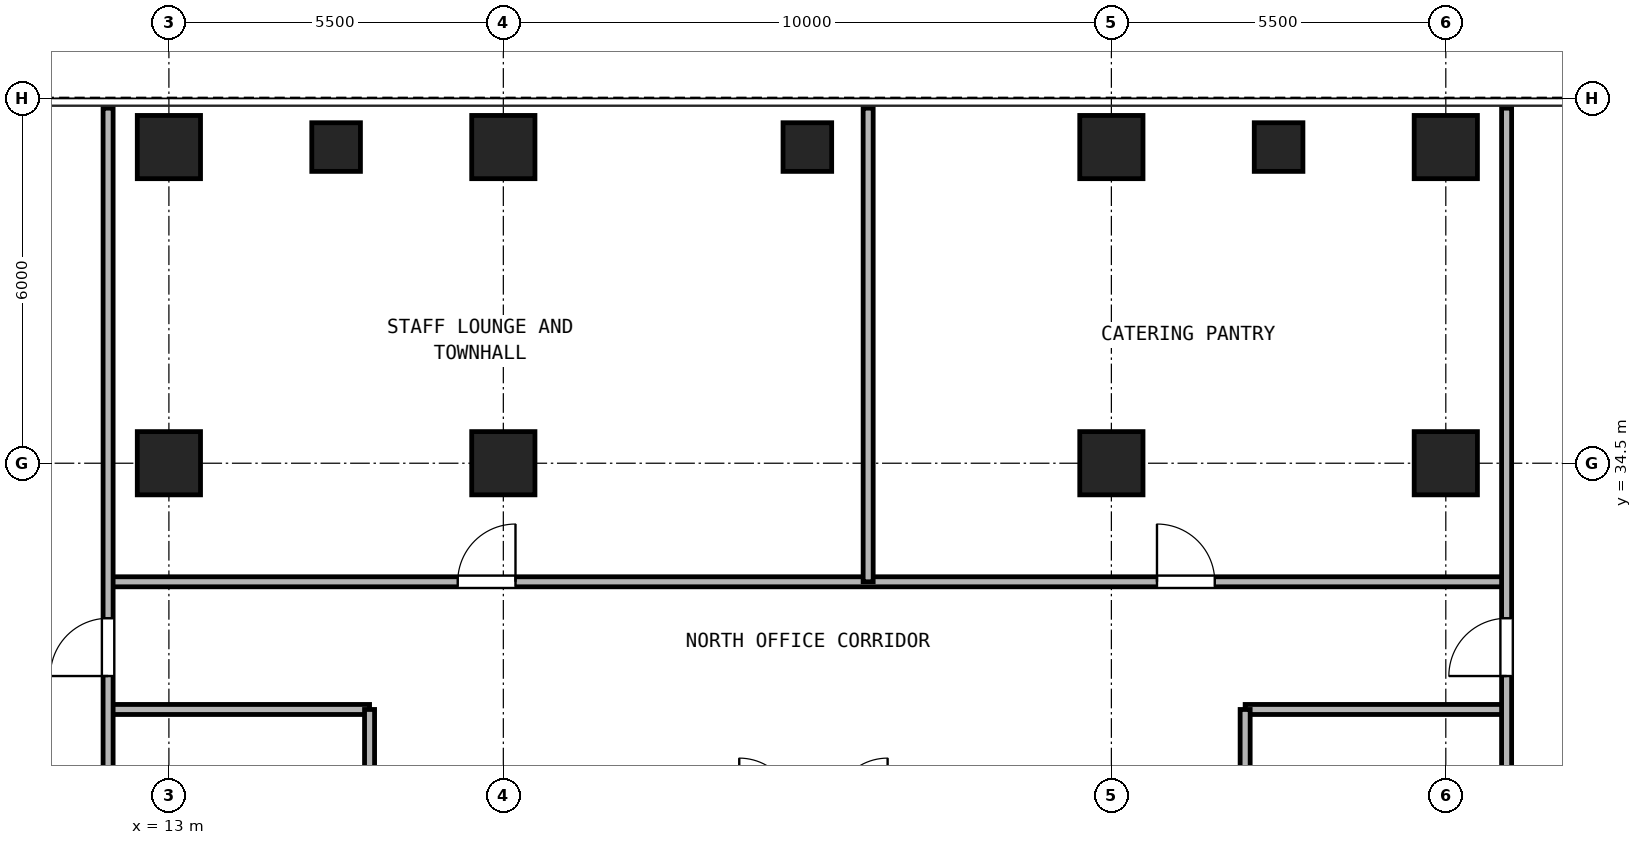
"""IFC4 building model, lengths in metres.
Left out: names, types, materials, properties, quantities, classifications, styles, units other than length and angle.
Written with IfcOpenShell. Run it as: python <this file> out.ifc"""

import sys

from ifc_helpers import new_model, si_unit, direction, frame, frame_2d, origin, origin_2d, place, context, subcontext, project, spatial, rectangle, hollow_rectangle, extrude, source, transform, mapped, element, fill, save


model = new_model("IFC4")
c1 = context("Model", 3, precision=1e-05, world=origin(), true_north=direction((0.0, 1.0)))
c2 = subcontext(c1, "Body", "Model", "MODEL_VIEW")
j1 = project(units=[si_unit("LENGTHUNIT", "METRE"), si_unit("PLANEANGLEUNIT", "RADIAN")], contexts=[c1])
p1 = place(None, origin())
s1 = spatial("IfcSite", under=j1, at=p1, CompositionType="ELEMENT")
p2 = place(p1, origin())
s2 = spatial("IfcBuilding", under=s1, at=p2, CompositionType="ELEMENT")
p3 = place(p2, frame((0.0, 0.0, 62.1)))
s3 = spatial("IfcBuildingStorey", under=s2, at=p3, CompositionType="ELEMENT", Elevation=62.1)
m1 = source(origin(), c2, "Body", "SweptSolid", [
    extrude(hollow_rectangle(XDim=1.04, YDim=1.04, WallThickness=0.065, at=origin_2d()), origin(), (0.0, 0.0, 1.0), 3.32),
])
for number, where, z_axis, x_axis in (
    (1, (13.0, 39.7, 0.0), (0.0, 0.0, 1.0), (1.0, 0.0, 0.0)),
    (2, (18.5, 39.7, 0.0), (0.0, 0.0, 1.0), (1.0, 0.0, 0.0)),
    (3, (28.5, 39.7, 0.0), (0.0, 0.0, 1.0), (1.0, 0.0, 0.0)),
    (4, (34.0, 39.7, 0.0), (0.0, 0.0, 1.0), (1.0, 0.0, 0.0)),
    (5, (13.0, 34.5, 0.0), (0.0, 0.0, 1.0), (1.0, 0.0, 0.0)),
    (6, (18.5, 34.5, 0.0), (0.0, 0.0, 1.0), (1.0, 0.0, 0.0)),
    (7, (28.5, 34.5, 0.0), (0.0, 0.0, 1.0), (1.0, 0.0, 0.0)),
    (8, (34.0, 34.5, 0.0), (0.0, 0.0, 1.0), (1.0, 0.0, 0.0)),
):
    element("IfcColumn", number, at=place(p3, frame(where, z_axis=z_axis, x_axis=x_axis)), inside=s3, PredefinedType="COLUMN", context=c2, shape_type="MappedRepresentation", body=[
        mapped(m1, transform((0.0, 0.0, 0.0), x_axis=(1.0, 0.0, 0.0), y_axis=(0.0, 1.0, 0.0), z_axis=(0.0, 0.0, 1.0), scale=1.0)),
    ])
m2 = source(origin(), c2, "Body", "SweptSolid", [
    extrude(hollow_rectangle(XDim=0.8, YDim=0.8, WallThickness=0.045, at=origin_2d()), origin(), (0.0, 0.0, 1.0), 3.32),
])
for number, where, z_axis, x_axis in (
    (9, (15.75, 39.7, 0.0), (0.0, 0.0, 1.0), (1.0, 0.0, 0.0)),
    (10, (23.5, 39.7, 0.0), (0.0, 0.0, 1.0), (1.0, 0.0, 0.0)),
    (11, (31.25, 39.7, 0.0), (0.0, 0.0, 1.0), (1.0, 0.0, 0.0)),
):
    element("IfcColumn", number, at=place(p3, frame(where, z_axis=z_axis, x_axis=x_axis)), inside=s3, PredefinedType="COLUMN", context=c2, shape_type="MappedRepresentation", body=[
        mapped(m2, transform((0.0, 0.0, 0.0), x_axis=(1.0, 0.0, 0.0), y_axis=(0.0, 1.0, 0.0), z_axis=(0.0, 0.0, 1.0), scale=1.0)),
    ])
p4 = place(p3, frame((12.0, 32.55, 0.0), z_axis=(0.0, 0.0, 1.0), x_axis=(1.0, 0.0, 0.0)))
e12 = element("IfcWall", 12, at=p4, inside=s3, PredefinedType="PARTITIONING", context=c2, shape_type="SweptSolid", body=[
    extrude(rectangle(XDim=23.0, YDim=0.165, at=frame_2d((11.5, 0.0))), origin(), (0.0, 0.0, 1.0), 3.32),
])
p5 = place(p4, frame((5.75, 0.0, 0.0)))
e13 = element("IfcOpeningElement", 13, at=p5, cuts=e12, PredefinedType="OPENING", context=c2, shape_type="SweptSolid", body=[
    extrude(rectangle(XDim=0.95, YDim=2.15, at=frame_2d((0.475, 1.075))), frame((0.0, 0.093, 0.0), z_axis=(0.0, -1.0, 0.0), x_axis=(1.0, 0.0, 0.0)), (0.0, 0.0, 1.0), 0.185),
])
p6 = place(p4, frame((17.25, 0.0, 0.0)))
e14 = element("IfcOpeningElement", 14, at=p6, cuts=e12, PredefinedType="OPENING", context=c2, shape_type="SweptSolid", body=[
    extrude(rectangle(XDim=0.95, YDim=2.15, at=frame_2d((0.475, 1.075))), frame((0.0, 0.093, 0.0), z_axis=(0.0, -1.0, 0.0), x_axis=(1.0, 0.0, 0.0)), (0.0, 0.0, 1.0), 0.185),
])
for number, where, z_axis, x_axis in (
    (15, (12.0, 30.45, 0.0), (0.0, 0.0, 1.0), (1.0, 0.0, 0.0)),
    (16, (30.7, 30.45, 0.0), (0.0, 0.0, 1.0), (1.0, 0.0, 0.0)),
):
    element("IfcWall", number, at=place(p3, frame(where, z_axis=z_axis, x_axis=x_axis)), inside=s3, PredefinedType="PARTITIONING", context=c2, shape_type="SweptSolid", body=[
        extrude(rectangle(XDim=4.3, YDim=0.165, at=frame_2d((2.15, 0.0))), origin(), (0.0, 0.0, 1.0), 3.32),
    ])
p7 = place(p3, frame((16.3, 9.55, 0.0), z_axis=(0.0, 0.0, 1.0), x_axis=(0.0, 1.0, 0.0)))
e17 = element("IfcWall", 17, at=p7, inside=s3, PredefinedType="PARTITIONING", context=c2, shape_type="SweptSolid", body=[
    extrude(rectangle(XDim=20.9, YDim=0.165, at=frame_2d((10.45, 0.0))), origin(), (0.0, 0.0, 1.0), 3.32),
])
p8 = place(p7, frame((6.231, 0.0, 0.0)))
e18 = element("IfcOpeningElement", 18, at=p8, cuts=e17, PredefinedType="OPENING", context=c2, shape_type="SweptSolid", body=[
    extrude(rectangle(XDim=0.95, YDim=2.15, at=frame_2d((0.475, 1.075))), frame((0.0, 0.093, 0.0), z_axis=(0.0, -1.0, 0.0), x_axis=(1.0, 0.0, 0.0)), (0.0, 0.0, 1.0), 0.185),
])
p9 = place(p7, frame((16.681, 0.0, 0.0)))
e19 = element("IfcOpeningElement", 19, at=p9, cuts=e17, PredefinedType="OPENING", context=c2, shape_type="SweptSolid", body=[
    extrude(rectangle(XDim=0.95, YDim=2.15, at=frame_2d((0.475, 1.075))), frame((0.0, 0.093, 0.0), z_axis=(0.0, -1.0, 0.0), x_axis=(1.0, 0.0, 0.0)), (0.0, 0.0, 1.0), 0.185),
])
p10 = place(p3, frame((30.7, 9.55, 0.0), z_axis=(0.0, 0.0, 1.0), x_axis=(0.0, 1.0, 0.0)))
e20 = element("IfcWall", 20, at=p10, inside=s3, PredefinedType="PARTITIONING", context=c2, shape_type="SweptSolid", body=[
    extrude(rectangle(XDim=20.9, YDim=0.165, at=frame_2d((10.45, 0.0))), origin(), (0.0, 0.0, 1.0), 3.32),
])
p11 = place(p10, frame((9.95, 0.0, 0.0)))
e21 = element("IfcOpeningElement", 21, at=p11, cuts=e20, PredefinedType="OPENING", context=c2, shape_type="SweptSolid", body=[
    extrude(rectangle(XDim=0.95, YDim=2.15, at=frame_2d((0.475, 1.075))), frame((0.0, 0.093, 0.0), z_axis=(0.0, -1.0, 0.0), x_axis=(1.0, 0.0, 0.0)), (0.0, 0.0, 1.0), 0.185),
])
p12 = place(p3, frame((12.0, 0.16, 0.0), z_axis=(0.0, 0.0, 1.0), x_axis=(0.0, 1.0, 0.0)))
e22 = element("IfcWall", 22, at=p12, inside=s3, PredefinedType="PARTITIONING", context=c2, shape_type="SweptSolid", body=[
    extrude(rectangle(XDim=40.18, YDim=0.165, at=frame_2d((20.09, 0.0))), origin(), (0.0, 0.0, 1.0), 3.32),
])
p13 = place(p12, frame((7.84, 0.0, 0.0)))
e23 = element("IfcOpeningElement", 23, at=p13, cuts=e22, PredefinedType="OPENING", context=c2, shape_type="SweptSolid", body=[
    extrude(rectangle(XDim=0.95, YDim=2.15, at=frame_2d((0.475, 1.075))), frame((0.0, 0.093, 0.0), z_axis=(0.0, -1.0, 0.0), x_axis=(1.0, 0.0, 0.0)), (0.0, 0.0, 1.0), 0.185),
])
p14 = place(p12, frame((30.84, 0.0, 0.0)))
e24 = element("IfcOpeningElement", 24, at=p14, cuts=e22, PredefinedType="OPENING", context=c2, shape_type="SweptSolid", body=[
    extrude(rectangle(XDim=0.95, YDim=2.15, at=frame_2d((0.475, 1.075))), frame((0.0, 0.093, 0.0), z_axis=(0.0, -1.0, 0.0), x_axis=(1.0, 0.0, 0.0)), (0.0, 0.0, 1.0), 0.185),
])
p15 = place(p3, frame((35.0, 0.16, 0.0), z_axis=(0.0, 0.0, 1.0), x_axis=(0.0, 1.0, 0.0)))
e25 = element("IfcWall", 25, at=p15, inside=s3, PredefinedType="PARTITIONING", context=c2, shape_type="SweptSolid", body=[
    extrude(rectangle(XDim=40.18, YDim=0.165, at=frame_2d((20.09, 0.0))), origin(), (0.0, 0.0, 1.0), 3.32),
])
p16 = place(p15, frame((7.84, 0.0, 0.0)))
e26 = element("IfcOpeningElement", 26, at=p16, cuts=e25, PredefinedType="OPENING", context=c2, shape_type="SweptSolid", body=[
    extrude(rectangle(XDim=0.95, YDim=2.15, at=frame_2d((0.475, 1.075))), frame((0.0, 0.093, 0.0), z_axis=(0.0, -1.0, 0.0), x_axis=(1.0, 0.0, 0.0)), (0.0, 0.0, 1.0), 0.185),
])
p17 = place(p15, frame((30.84, 0.0, 0.0)))
e27 = element("IfcOpeningElement", 27, at=p17, cuts=e25, PredefinedType="OPENING", context=c2, shape_type="SweptSolid", body=[
    extrude(rectangle(XDim=0.95, YDim=2.15, at=frame_2d((0.475, 1.075))), frame((0.0, 0.093, 0.0), z_axis=(0.0, -1.0, 0.0), x_axis=(1.0, 0.0, 0.0)), (0.0, 0.0, 1.0), 0.185),
])
p18 = place(p3, frame((24.5, 32.55, 0.0), z_axis=(0.0, 0.0, 1.0), x_axis=(0.0, 1.0, 0.0)))
e28 = element("IfcWall", 28, at=p18, inside=s3, PredefinedType="PARTITIONING", context=c2, shape_type="SweptSolid", body=[
    extrude(rectangle(XDim=7.79, YDim=0.165, at=frame_2d((3.895, 0.0))), origin(), (0.0, 0.0, 1.0), 3.32),
])
p19 = place(p5, origin())
e29 = element("IfcDoor", 29, at=p19, inside=s3, OperationType="SINGLE_SWING_RIGHT", PredefinedType="DOOR", context=c2, shape_type="SweptSolid", body=[
    extrude(rectangle(XDim=0.95, YDim=2.15, at=frame_2d((0.475, 1.075))), frame((0.0, 0.025, 0.0), z_axis=(0.0, -1.0, 0.0), x_axis=(1.0, 0.0, 0.0)), (0.0, 0.0, 1.0), 0.05),
])
fill(e13, e29)
p20 = place(p6, origin())
e30 = element("IfcDoor", 30, at=p20, inside=s3, OperationType="SINGLE_SWING_LEFT", PredefinedType="DOOR", context=c2, shape_type="SweptSolid", body=[
    extrude(rectangle(XDim=0.95, YDim=2.15, at=frame_2d((0.475, 1.075))), frame((0.0, 0.025, 0.0), z_axis=(0.0, -1.0, 0.0), x_axis=(1.0, 0.0, 0.0)), (0.0, 0.0, 1.0), 0.05),
])
fill(e14, e30)
p21 = place(p14, frame((0.95, 0.0, 0.0), z_axis=(0.0, 0.0, 1.0), x_axis=(-1.0, 0.0, 0.0)))
e31 = element("IfcDoor", 31, at=p21, inside=s3, OperationType="SINGLE_SWING_LEFT", PredefinedType="DOOR", context=c2, shape_type="SweptSolid", body=[
    extrude(rectangle(XDim=0.95, YDim=2.15, at=frame_2d((0.475, 1.075))), frame((0.0, 0.025, 0.0), z_axis=(0.0, -1.0, 0.0), x_axis=(1.0, 0.0, 0.0)), (0.0, 0.0, 1.0), 0.05),
])
fill(e24, e31)
p22 = place(p17, origin())
e32 = element("IfcDoor", 32, at=p22, inside=s3, OperationType="SINGLE_SWING_LEFT", PredefinedType="DOOR", context=c2, shape_type="SweptSolid", body=[
    extrude(rectangle(XDim=0.95, YDim=2.15, at=frame_2d((0.475, 1.075))), frame((0.0, 0.025, 0.0), z_axis=(0.0, -1.0, 0.0), x_axis=(1.0, 0.0, 0.0)), (0.0, 0.0, 1.0), 0.05),
])
fill(e27, e32)
save(model, sys.argv[1])
